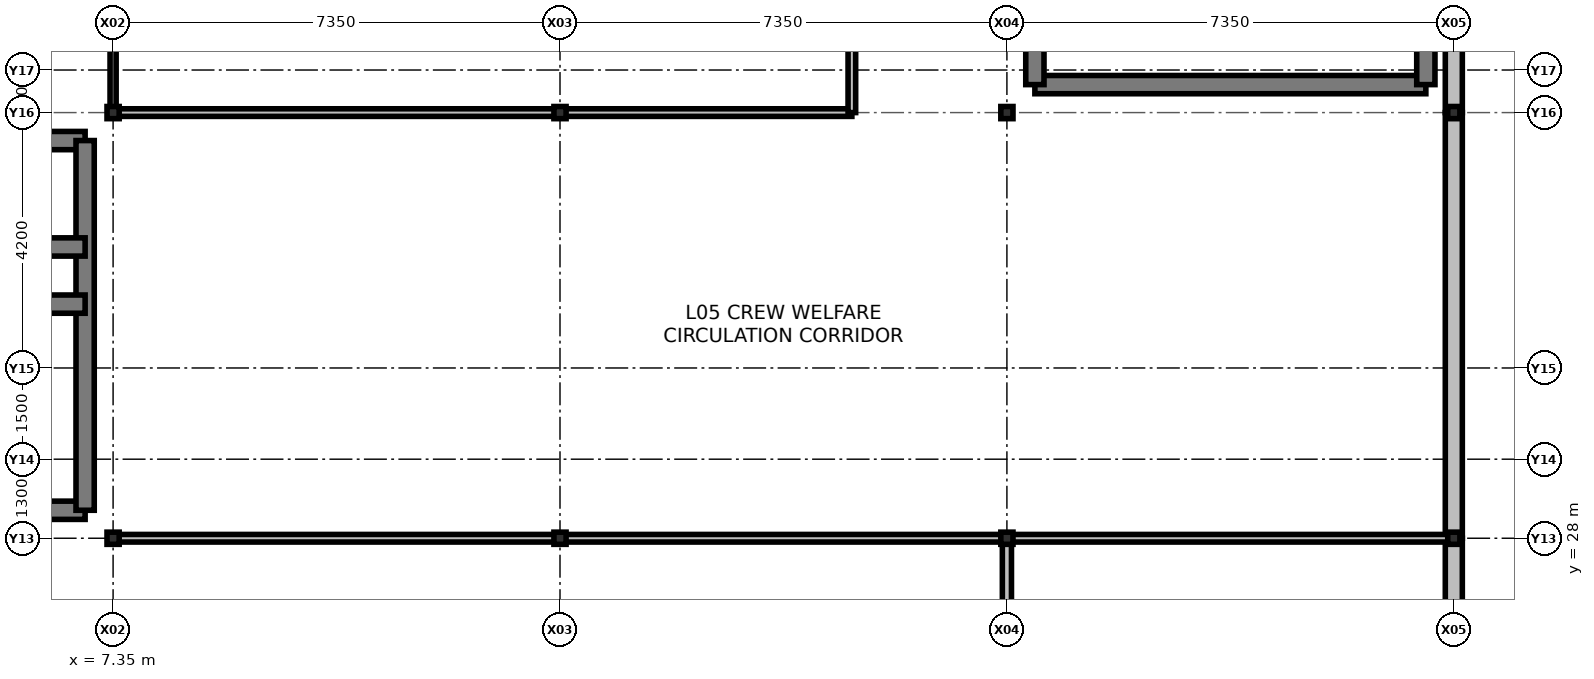
"""IFC4 building model, lengths in metres.
Left out: names, types, materials, properties, quantities, classifications, styles, units other than length and angle.
Written with IfcOpenShell. Run it as: python <this file> out.ifc"""

import sys

from ifc_helpers import new_model, si_unit, direction, frame, frame_2d, origin, origin_2d, place, context, subcontext, project, spatial, rectangle, i_section, extrude, element, fill, save


model = new_model("IFC4")
c1 = context("Model", 3, precision=1e-05, world=origin(), true_north=direction((0.0, 1.0)))
c2 = subcontext(c1, "Body", "Model", "MODEL_VIEW")
j1 = project(units=[si_unit("LENGTHUNIT", "METRE"), si_unit("PLANEANGLEUNIT", "RADIAN")], contexts=[c1])
p1 = place(None, origin())
s1 = spatial("IfcSite", under=j1, at=p1, CompositionType="ELEMENT")
p2 = place(p1, origin())
s2 = spatial("IfcBuilding", under=s1, at=p2, CompositionType="ELEMENT")
p3 = place(p2, frame((0.0, 0.0, 19.5)))
s3 = spatial("IfcBuildingStorey", under=s2, at=p3, CompositionType="ELEMENT", Elevation=19.5)
for number, where, z_axis, x_axis in (
    (1, (7.35, 28.0, 0.0), (0.0, 0.0, 1.0), (1.0, 0.0, 0.0)),
    (2, (7.35, 35.0, 0.0), (0.0, 0.0, 1.0), (1.0, 0.0, 0.0)),
    (3, (14.7, 28.0, 0.0), (0.0, 0.0, 1.0), (1.0, 0.0, 0.0)),
    (4, (14.7, 35.0, 0.0), (0.0, 0.0, 1.0), (1.0, 0.0, 0.0)),
    (5, (22.05, 28.0, 0.0), (0.0, 0.0, 1.0), (1.0, 0.0, 0.0)),
    (6, (22.05, 35.0, 0.0), (0.0, 0.0, 1.0), (1.0, 0.0, 0.0)),
    (7, (29.4, 28.0, 0.0), (0.0, 0.0, 1.0), (1.0, 0.0, 0.0)),
    (8, (29.4, 35.0, 0.0), (0.0, 0.0, 1.0), (1.0, 0.0, 0.0)),
):
    element("IfcColumn", number, at=place(p3, frame(where, z_axis=z_axis, x_axis=x_axis)), inside=s3, PredefinedType="COLUMN", context=c2, shape_type="SweptSolid", body=[
        extrude(i_section(OverallWidth=0.2, OverallDepth=0.2, WebThickness=0.008, FlangeThickness=0.012, at=origin_2d()), origin(), (0.0, 0.0, 1.0), 4.2),
    ])
p4 = place(p3, frame((29.4, 21.0, 0.0), z_axis=(0.0, 0.0, 1.0), x_axis=(0.0, 1.0, 0.0)))
e9 = element("IfcWall", 9, at=p4, inside=s3, PredefinedType="SOLIDWALL", context=c2, shape_type="SweptSolid", body=[
    extrude(rectangle(XDim=7.0, YDim=0.28, at=frame_2d((3.5, 0.0))), origin(), (0.0, 0.0, 1.0), 3.48),
])
p5 = place(p4, frame((2.95, 0.0, 0.0)))
e10 = element("IfcOpeningElement", 10, at=p5, cuts=e9, PredefinedType="OPENING", context=c2, shape_type="SweptSolid", body=[
    extrude(rectangle(XDim=1.1, YDim=2.2, at=frame_2d((0.55, 1.1))), frame((0.0, 0.15, 0.0), z_axis=(0.0, -1.0, 0.0), x_axis=(1.0, 0.0, 0.0)), (0.0, 0.0, 1.0), 0.3),
])
p6 = place(p3, frame((29.4, 28.0, 0.0), z_axis=(0.0, 0.0, 1.0), x_axis=(0.0, 1.0, 0.0)))
e11 = element("IfcWall", 11, at=p6, inside=s3, PredefinedType="SOLIDWALL", context=c2, shape_type="SweptSolid", body=[
    extrude(rectangle(XDim=7.0, YDim=0.28, at=frame_2d((3.5, 0.0))), origin(), (0.0, 0.0, 1.0), 3.48),
])
p7 = place(p6, frame((2.2, 0.0, 0.9)))
e12 = element("IfcOpeningElement", 12, at=p7, cuts=e11, PredefinedType="OPENING", context=c2, shape_type="SweptSolid", body=[
    extrude(rectangle(XDim=3.0, YDim=1.8, at=frame_2d((1.5, 0.9))), frame((0.0, 0.15, 0.0), z_axis=(0.0, -1.0, 0.0), x_axis=(1.0, 0.0, 0.0)), (0.0, 0.0, 1.0), 0.3),
])
p8 = place(p3, frame((29.4, 35.0, 0.0), z_axis=(0.0, 0.0, 1.0), x_axis=(0.0, 1.0, 0.0)))
e13 = element("IfcWall", 13, at=p8, inside=s3, PredefinedType="SOLIDWALL", context=c2, shape_type="SweptSolid", body=[
    extrude(rectangle(XDim=7.0, YDim=0.28, at=frame_2d((3.5, 0.0))), origin(), (0.0, 0.0, 1.0), 3.48),
])
p9 = place(p8, frame((2.2, 0.0, 0.9)))
e14 = element("IfcOpeningElement", 14, at=p9, cuts=e13, PredefinedType="OPENING", context=c2, shape_type="SweptSolid", body=[
    extrude(rectangle(XDim=3.0, YDim=2.2, at=frame_2d((1.5, 1.1))), frame((0.0, 0.15, 0.0), z_axis=(0.0, -1.0, 0.0), x_axis=(1.0, 0.0, 0.0)), (0.0, 0.0, 1.0), 0.3),
])
p10 = place(p3, frame((0.46, 28.46, 0.0), z_axis=(0.0, 0.0, 1.0), x_axis=(1.0, 0.0, 0.0)))
e15 = element("IfcWall", 15, at=p10, inside=s3, PredefinedType="SHEAR", context=c2, shape_type="SweptSolid", body=[
    extrude(rectangle(XDim=6.43, YDim=0.3, at=frame_2d((3.215, 0.0))), origin(), (0.0, 0.0, 1.0), 3.92),
])
p11 = place(p3, frame((0.46, 34.54, 0.0), z_axis=(0.0, 0.0, 1.0), x_axis=(1.0, 0.0, 0.0)))
e16 = element("IfcWall", 16, at=p11, inside=s3, PredefinedType="SHEAR", context=c2, shape_type="SweptSolid", body=[
    extrude(rectangle(XDim=6.43, YDim=0.3, at=frame_2d((3.215, 0.0))), origin(), (0.0, 0.0, 1.0), 3.92),
])
p12 = place(p11, frame((0.55, 0.0, 0.0)))
e17 = element("IfcOpeningElement", 17, at=p12, cuts=e16, PredefinedType="OPENING", context=c2, shape_type="SweptSolid", body=[
    extrude(rectangle(XDim=1.5, YDim=2.2, at=frame_2d((0.75, 1.1))), frame((0.0, 0.16, 0.0), z_axis=(0.0, -1.0, 0.0), x_axis=(1.0, 0.0, 0.0)), (0.0, 0.0, 1.0), 0.32),
])
p13 = place(p3, frame((6.89, 28.46, 0.0), z_axis=(0.0, 0.0, 1.0), x_axis=(0.0, 1.0, 0.0)))
e18 = element("IfcWall", 18, at=p13, inside=s3, PredefinedType="SHEAR", context=c2, shape_type="SweptSolid", body=[
    extrude(rectangle(XDim=6.08, YDim=0.3, at=frame_2d((3.04, 0.0))), origin(), (0.0, 0.0, 1.0), 3.92),
])
p14 = place(p3, frame((0.46, 31.85, 0.0), z_axis=(0.0, 0.0, 1.0), x_axis=(1.0, 0.0, 0.0)))
e19 = element("IfcWall", 19, at=p14, inside=s3, PredefinedType="SHEAR", context=c2, shape_type="SweptSolid", body=[
    extrude(rectangle(XDim=6.43, YDim=0.3, at=frame_2d((3.215, 0.0))), origin(), (0.0, 0.0, 1.0), 3.92),
])
p15 = place(p14, frame((0.185, 0.0, 0.0)))
e20 = element("IfcOpeningElement", 20, at=p15, cuts=e19, PredefinedType="OPENING", context=c2, shape_type="SweptSolid", body=[
    extrude(rectangle(XDim=1.05, YDim=2.15, at=frame_2d((0.525, 1.075))), frame((0.0, 0.16, 0.0), z_axis=(0.0, -1.0, 0.0), x_axis=(1.0, 0.0, 0.0)), (0.0, 0.0, 1.0), 0.32),
])
p16 = place(p3, frame((3.34, 32.79, 0.0), z_axis=(0.0, 0.0, 1.0), x_axis=(1.0, 0.0, 0.0)))
e21 = element("IfcWall", 21, at=p16, inside=s3, PredefinedType="SHEAR", context=c2, shape_type="SweptSolid", body=[
    extrude(rectangle(XDim=3.55, YDim=0.3, at=frame_2d((1.775, 0.0))), origin(), (0.0, 0.0, 1.0), 3.92),
])
p17 = place(p16, frame((0.25, 0.0, 0.0)))
e22 = element("IfcOpeningElement", 22, at=p17, cuts=e21, PredefinedType="OPENING", context=c2, shape_type="SweptSolid", body=[
    extrude(rectangle(XDim=1.1, YDim=2.15, at=frame_2d((0.55, 1.075))), frame((0.0, 0.16, 0.0), z_axis=(0.0, -1.0, 0.0), x_axis=(1.0, 0.0, 0.0)), (0.0, 0.0, 1.0), 0.32),
])
p18 = place(p16, frame((1.75, 0.0, 0.0)))
e23 = element("IfcOpeningElement", 23, at=p18, cuts=e21, PredefinedType="OPENING", context=c2, shape_type="SweptSolid", body=[
    extrude(rectangle(XDim=1.2, YDim=2.2, at=frame_2d((0.6, 1.1))), frame((0.0, 0.16, 0.0), z_axis=(0.0, -1.0, 0.0), x_axis=(1.0, 0.0, 0.0)), (0.0, 0.0, 1.0), 0.32),
])
p19 = place(p3, frame((22.51, 35.46, 0.0), z_axis=(0.0, 0.0, 1.0), x_axis=(1.0, 0.0, 0.0)))
e24 = element("IfcWall", 24, at=p19, inside=s3, PredefinedType="SHEAR", context=c2, shape_type="SweptSolid", body=[
    extrude(rectangle(XDim=6.43, YDim=0.3, at=frame_2d((3.215, 0.0))), origin(), (0.0, 0.0, 1.0), 3.92),
])
p20 = place(p3, frame((22.51, 35.46, 0.0), z_axis=(0.0, 0.0, 1.0), x_axis=(0.0, 1.0, 0.0)))
e25 = element("IfcWall", 25, at=p20, inside=s3, PredefinedType="SHEAR", context=c2, shape_type="SweptSolid", body=[
    extrude(rectangle(XDim=6.08, YDim=0.3, at=frame_2d((3.04, 0.0))), origin(), (0.0, 0.0, 1.0), 3.92),
])
p21 = place(p20, frame((3.84, 0.0, 0.0)))
e26 = element("IfcOpeningElement", 26, at=p21, cuts=e25, PredefinedType="OPENING", context=c2, shape_type="SweptSolid", body=[
    extrude(rectangle(XDim=1.5, YDim=2.2, at=frame_2d((0.75, 1.1))), frame((0.0, 0.16, 0.0), z_axis=(0.0, -1.0, 0.0), x_axis=(1.0, 0.0, 0.0)), (0.0, 0.0, 1.0), 0.32),
])
p22 = place(p3, frame((28.94, 35.46, 0.0), z_axis=(0.0, 0.0, 1.0), x_axis=(0.0, 1.0, 0.0)))
e27 = element("IfcWall", 27, at=p22, inside=s3, PredefinedType="SHEAR", context=c2, shape_type="SweptSolid", body=[
    extrude(rectangle(XDim=6.08, YDim=0.3, at=frame_2d((3.04, 0.0))), origin(), (0.0, 0.0, 1.0), 3.92),
])
p23 = place(p3, frame((22.05, 0.0, 0.0), z_axis=(0.0, 0.0, 1.0), x_axis=(0.0, 1.0, 0.0)))
e28 = element("IfcWall", 28, at=p23, inside=s3, PredefinedType="PARTITIONING", context=c2, shape_type="SweptSolid", body=[
    extrude(rectangle(XDim=28.0, YDim=0.15, at=frame_2d((14.0, 0.0))), origin(), (0.0, 0.0, 1.0), 3.25),
])
p24 = place(p23, frame((4.0, 0.0, 0.0)))
e29 = element("IfcOpeningElement", 29, at=p24, cuts=e28, PredefinedType="OPENING", context=c2, shape_type="SweptSolid", body=[
    extrude(rectangle(XDim=1.2, YDim=2.1, at=frame_2d((0.6, 1.05))), frame((0.0, 0.085, 0.0), z_axis=(0.0, -1.0, 0.0), x_axis=(1.0, 0.0, 0.0)), (0.0, 0.0, 1.0), 0.17),
])
p25 = place(p23, frame((24.0, 0.0, 0.0)))
e30 = element("IfcOpeningElement", 30, at=p25, cuts=e28, PredefinedType="OPENING", context=c2, shape_type="SweptSolid", body=[
    extrude(rectangle(XDim=1.1, YDim=2.1, at=frame_2d((0.55, 1.05))), frame((0.0, 0.085, 0.0), z_axis=(0.0, -1.0, 0.0), x_axis=(1.0, 0.0, 0.0)), (0.0, 0.0, 1.0), 0.17),
])
p26 = place(p3, frame((7.35, 28.0, 0.0), z_axis=(0.0, 0.0, 1.0), x_axis=(1.0, 0.0, 0.0)))
e31 = element("IfcWall", 31, at=p26, inside=s3, PredefinedType="PARTITIONING", context=c2, shape_type="SweptSolid", body=[
    extrude(rectangle(XDim=22.05, YDim=0.125, at=frame_2d((11.025, 0.0))), origin(), (0.0, 0.0, 1.0), 3.25),
])
p27 = place(p26, frame((4.0, 0.0, 0.0)))
e32 = element("IfcOpeningElement", 32, at=p27, cuts=e31, PredefinedType="OPENING", context=c2, shape_type="SweptSolid", body=[
    extrude(rectangle(XDim=1.35, YDim=2.2, at=frame_2d((0.675, 1.1))), frame((0.0, 0.072, 0.0), z_axis=(0.0, -1.0, 0.0), x_axis=(1.0, 0.0, 0.0)), (0.0, 0.0, 1.0), 0.145),
])
p28 = place(p26, frame((17.5, 0.0, 0.0)))
e33 = element("IfcOpeningElement", 33, at=p28, cuts=e31, PredefinedType="OPENING", context=c2, shape_type="SweptSolid", body=[
    extrude(rectangle(XDim=1.0, YDim=2.2, at=frame_2d((0.5, 1.1))), frame((0.0, 0.072, 0.0), z_axis=(0.0, -1.0, 0.0), x_axis=(1.0, 0.0, 0.0)), (0.0, 0.0, 1.0), 0.145),
])
p29 = place(p3, frame((7.35, 35.0, 0.0), z_axis=(0.0, 0.0, 1.0), x_axis=(1.0, 0.0, 0.0)))
e34 = element("IfcWall", 34, at=p29, inside=s3, PredefinedType="PARTITIONING", context=c2, shape_type="SweptSolid", body=[
    extrude(rectangle(XDim=12.15, YDim=0.125, at=frame_2d((6.075, 0.0))), origin(), (0.0, 0.0, 1.0), 3.25),
])
p30 = place(p29, frame((4.0, 0.0, 0.0)))
e35 = element("IfcOpeningElement", 35, at=p30, cuts=e34, PredefinedType="OPENING", context=c2, shape_type="SweptSolid", body=[
    extrude(rectangle(XDim=1.25, YDim=2.15, at=frame_2d((0.625, 1.075))), frame((0.0, 0.072, 0.0), z_axis=(0.0, -1.0, 0.0), x_axis=(1.0, 0.0, 0.0)), (0.0, 0.0, 1.0), 0.145),
])
p31 = place(p3, frame((19.5, 35.0, 0.0), z_axis=(0.0, 0.0, 1.0), x_axis=(0.0, 1.0, 0.0)))
e36 = element("IfcWall", 36, at=p31, inside=s3, PredefinedType="PARTITIONING", context=c2, shape_type="SweptSolid", body=[
    extrude(rectangle(XDim=7.0, YDim=0.125, at=frame_2d((3.5, 0.0))), origin(), (0.0, 0.0, 1.0), 3.25),
])
p32 = place(p3, frame((7.35, 35.0, 0.0), z_axis=(0.0, 0.0, 1.0), x_axis=(0.0, 1.0, 0.0)))
e37 = element("IfcWall", 37, at=p32, inside=s3, PredefinedType="PARTITIONING", context=c2, shape_type="SweptSolid", body=[
    extrude(rectangle(XDim=7.0, YDim=0.1, at=frame_2d((3.5, 0.0))), origin(), (0.0, 0.0, 1.0), 3.25),
])
p33 = place(p32, frame((2.8, 0.0, 0.0)))
e38 = element("IfcOpeningElement", 38, at=p33, cuts=e37, PredefinedType="OPENING", context=c2, shape_type="SweptSolid", body=[
    extrude(rectangle(XDim=0.9, YDim=2.1, at=frame_2d((0.45, 1.05))), frame((0.0, 0.06, 0.0), z_axis=(0.0, -1.0, 0.0), x_axis=(1.0, 0.0, 0.0)), (0.0, 0.0, 1.0), 0.12),
])
p34 = place(p7, origin())
e39 = element("IfcWindow", 39, at=p34, inside=s3, PartitioningType="SINGLE_PANEL", PredefinedType="WINDOW", context=c2, shape_type="SweptSolid", body=[
    extrude(rectangle(XDim=3.0, YDim=1.8, at=frame_2d((1.5, 0.9))), frame((0.0, 0.03, 0.0), z_axis=(0.0, -1.0, 0.0), x_axis=(1.0, 0.0, 0.0)), (0.0, 0.0, 1.0), 0.06),
])
fill(e12, e39)
p35 = place(p27, origin())
e40 = element("IfcDoor", 40, at=p35, inside=s3, OperationType="DOUBLE_DOOR_SINGLE_SWING", PredefinedType="DOOR", context=c2, shape_type="SweptSolid", body=[
    extrude(rectangle(XDim=1.35, YDim=2.2, at=frame_2d((0.675, 1.1))), frame((0.0, 0.025, 0.0), z_axis=(0.0, -1.0, 0.0), x_axis=(1.0, 0.0, 0.0)), (0.0, 0.0, 1.0), 0.05),
])
fill(e32, e40)
p36 = place(p28, origin())
e41 = element("IfcDoor", 41, at=p36, inside=s3, OperationType="SINGLE_SWING_RIGHT", PredefinedType="DOOR", context=c2, shape_type="SweptSolid", body=[
    extrude(rectangle(XDim=1.0, YDim=2.2, at=frame_2d((0.5, 1.1))), frame((0.0, 0.025, 0.0), z_axis=(0.0, -1.0, 0.0), x_axis=(1.0, 0.0, 0.0)), (0.0, 0.0, 1.0), 0.05),
])
fill(e33, e41)
p37 = place(p30, origin())
e42 = element("IfcDoor", 42, at=p37, inside=s3, OperationType="SINGLE_SWING_LEFT", PredefinedType="DOOR", context=c2, shape_type="SweptSolid", body=[
    extrude(rectangle(XDim=1.25, YDim=2.15, at=frame_2d((0.625, 1.075))), frame((0.0, 0.025, 0.0), z_axis=(0.0, -1.0, 0.0), x_axis=(1.0, 0.0, 0.0)), (0.0, 0.0, 1.0), 0.05),
])
fill(e35, e42)
save(model, sys.argv[1])
